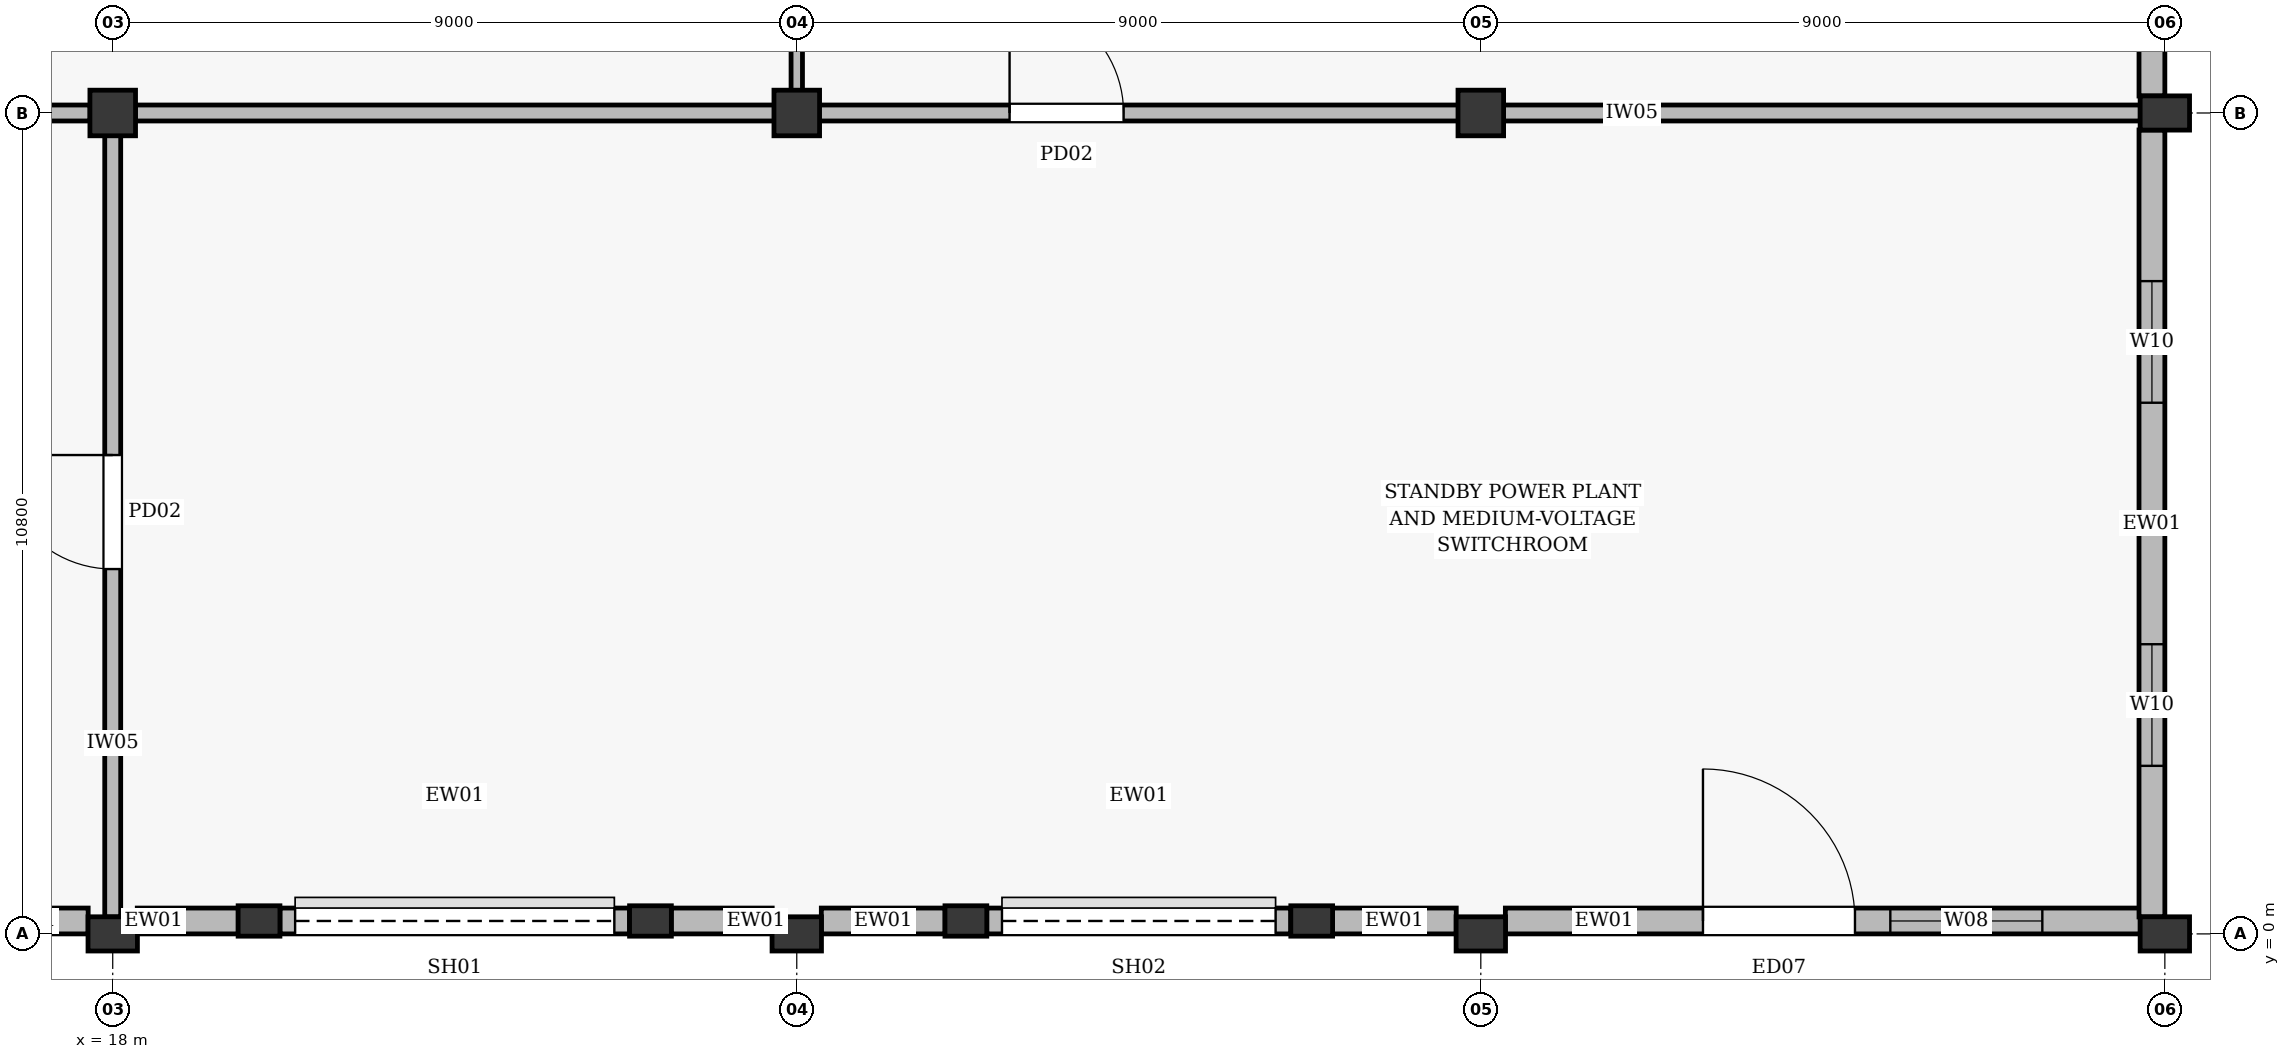
"""IFC4 building model, lengths in metres.
Left out: names, types, materials, properties, quantities, classifications, styles, units other than length and angle.
Written with IfcOpenShell. Run it as: python <this file> out.ifc"""

import sys

from ifc_helpers import new_model, si_unit, direction, frame, frame_2d, origin, origin_2d, place, context, subcontext, project, spatial, rectangle, extrude, element, fill, save


model = new_model("IFC4")
c1 = context("Model", 3, precision=1e-05, world=origin(), true_north=direction((0.0, 1.0)))
c2 = subcontext(c1, "Body", "Model", "MODEL_VIEW")
j1 = project(units=[si_unit("LENGTHUNIT", "METRE"), si_unit("PLANEANGLEUNIT", "RADIAN")], contexts=[c1])
p1 = place(None, origin())
s1 = spatial("IfcSite", under=j1, at=p1, CompositionType="ELEMENT")
p2 = place(p1, origin())
s2 = spatial("IfcBuilding", under=s1, at=p2, CompositionType="ELEMENT")
p3 = place(p2, origin())
s3 = spatial("IfcBuildingStorey", under=s2, at=p3, CompositionType="ELEMENT", Elevation=0.0)
p4 = place(p3, frame((18.0, 0.0, 0.0), z_axis=(0.0, 0.0, 1.0), x_axis=(1.0, 0.0, 0.0)))
e1 = element("IfcColumn", 1, at=p4, inside=s3, PredefinedType="PILASTER", context=c2, shape_type="SweptSolid", body=[
    extrude(rectangle(XDim=0.65, YDim=0.45, at=origin_2d()), origin(), (0.0, 0.0, 1.0), 6.6),
])
p5 = place(p3, frame((18.0, 10.8, 0.0), z_axis=(0.0, 0.0, 1.0), x_axis=(1.0, 0.0, 0.0)))
e2 = element("IfcColumn", 2, at=p5, inside=s3, PredefinedType="COLUMN", context=c2, shape_type="SweptSolid", body=[
    extrude(rectangle(XDim=0.6, YDim=0.6, at=origin_2d()), origin(), (0.0, 0.0, 1.0), 6.6),
])
p6 = place(p3, frame((27.0, 0.0, 0.0), z_axis=(0.0, 0.0, 1.0), x_axis=(1.0, 0.0, 0.0)))
e3 = element("IfcColumn", 3, at=p6, inside=s3, PredefinedType="PILASTER", context=c2, shape_type="SweptSolid", body=[
    extrude(rectangle(XDim=0.65, YDim=0.45, at=origin_2d()), origin(), (0.0, 0.0, 1.0), 6.6),
])
p7 = place(p3, frame((27.0, 10.8, 0.0), z_axis=(0.0, 0.0, 1.0), x_axis=(1.0, 0.0, 0.0)))
e4 = element("IfcColumn", 4, at=p7, inside=s3, PredefinedType="COLUMN", context=c2, shape_type="SweptSolid", body=[
    extrude(rectangle(XDim=0.6, YDim=0.6, at=origin_2d()), origin(), (0.0, 0.0, 1.0), 6.6),
])
p8 = place(p3, frame((36.0, 0.0, 0.0), z_axis=(0.0, 0.0, 1.0), x_axis=(1.0, 0.0, 0.0)))
e5 = element("IfcColumn", 5, at=p8, inside=s3, PredefinedType="PILASTER", context=c2, shape_type="SweptSolid", body=[
    extrude(rectangle(XDim=0.65, YDim=0.45, at=origin_2d()), origin(), (0.0, 0.0, 1.0), 6.6),
])
p9 = place(p3, frame((36.0, 10.8, 0.0), z_axis=(0.0, 0.0, 1.0), x_axis=(1.0, 0.0, 0.0)))
e6 = element("IfcColumn", 6, at=p9, inside=s3, PredefinedType="COLUMN", context=c2, shape_type="SweptSolid", body=[
    extrude(rectangle(XDim=0.6, YDim=0.6, at=origin_2d()), origin(), (0.0, 0.0, 1.0), 6.6),
])
for number, where, z_axis, x_axis in (
    (7, (45.0, 0.0, 0.0), (0.0, 0.0, 1.0), (1.0, 0.0, 0.0)),
    (8, (45.0, 10.8, 0.0), (0.0, 0.0, 1.0), (1.0, 0.0, 0.0)),
):
    element("IfcColumn", number, at=place(p3, frame(where, z_axis=z_axis, x_axis=x_axis)), inside=s3, PredefinedType="PILASTER", context=c2, shape_type="SweptSolid", body=[
        extrude(rectangle(XDim=0.65, YDim=0.45, at=origin_2d()), origin(), (0.0, 0.0, 1.0), 6.6),
    ])
p10 = place(p3, frame((16.048, 0.17, 0.0), z_axis=(0.0, 0.0, 1.0), x_axis=(1.0, 0.0, 0.0)))
e9 = element("IfcWall", 9, at=p10, inside=s3, PredefinedType="STANDARD", context=c2, shape_type="SweptSolid", body=[
    extrude(rectangle(XDim=1.629, YDim=0.34, at=frame_2d((0.814, 0.0))), origin(), (0.0, 0.0, 1.0), 4.28),
])
for number, where, z_axis, x_axis in (
    (10, (19.925, 0.17, 0.0), (0.0, 0.0, 1.0), (1.0, 0.0, 0.0)),
    (11, (25.075, 0.17, 0.0), (0.0, 0.0, 1.0), (1.0, 0.0, 0.0)),
):
    element("IfcColumn", number, at=place(p3, frame(where, z_axis=z_axis, x_axis=x_axis)), inside=s3, PredefinedType="PILASTER", context=c2, shape_type="SweptSolid", body=[
        extrude(rectangle(XDim=0.55, YDim=0.4, at=origin_2d()), origin(), (0.0, 0.0, 1.0), 4.3),
    ])
for number, where, z_axis, x_axis in (
    (12, (18.323, 0.17, 0.0), (0.0, 0.0, 1.0), (1.0, 0.0, 0.0)),
    (13, (25.348, 0.17, 0.0), (0.0, 0.0, 1.0), (1.0, 0.0, 0.0)),
):
    element("IfcWall", number, at=place(p3, frame(where, z_axis=z_axis, x_axis=x_axis)), inside=s3, PredefinedType="STANDARD", context=c2, shape_type="SweptSolid", body=[
        extrude(rectangle(XDim=1.329, YDim=0.34, at=frame_2d((0.665, 0.0))), origin(), (0.0, 0.0, 1.0), 4.28),
    ])
p11 = place(p3, frame((20.2, 0.17, 0.0), z_axis=(0.0, 0.0, 1.0), x_axis=(1.0, 0.0, 0.0)))
e14 = element("IfcWall", 14, at=p11, inside=s3, PredefinedType="STANDARD", context=c2, shape_type="SweptSolid", body=[
    extrude(rectangle(XDim=4.6, YDim=0.34, at=frame_2d((2.3, 0.0))), origin(), (0.0, 0.0, 1.0), 4.26),
])
p12 = place(p11, frame((0.2, 0.0, 0.005)))
e15 = element("IfcOpeningElement", 15, at=p12, cuts=e14, PredefinedType="OPENING", context=c2, shape_type="SweptSolid", body=[
    extrude(rectangle(XDim=4.2, YDim=3.6, at=frame_2d((2.1, 1.8))), frame((0.0, 0.182, 0.0), z_axis=(0.0, -1.0, 0.0), x_axis=(1.0, 0.0, 0.0)), (0.0, 0.0, 1.0), 0.364),
])
for number, where, z_axis, x_axis in (
    (16, (29.225, 0.17, 0.0), (0.0, 0.0, 1.0), (1.0, 0.0, 0.0)),
    (17, (33.775, 0.17, 0.0), (0.0, 0.0, 1.0), (1.0, 0.0, 0.0)),
):
    element("IfcColumn", number, at=place(p3, frame(where, z_axis=z_axis, x_axis=x_axis)), inside=s3, PredefinedType="PILASTER", context=c2, shape_type="SweptSolid", body=[
        extrude(rectangle(XDim=0.55, YDim=0.4, at=origin_2d()), origin(), (0.0, 0.0, 1.0), 4.3),
    ])
for number, where, z_axis, x_axis in (
    (18, (27.323, 0.17, 0.0), (0.0, 0.0, 1.0), (1.0, 0.0, 0.0)),
    (19, (34.048, 0.17, 0.0), (0.0, 0.0, 1.0), (1.0, 0.0, 0.0)),
):
    element("IfcWall", number, at=place(p3, frame(where, z_axis=z_axis, x_axis=x_axis)), inside=s3, PredefinedType="STANDARD", context=c2, shape_type="SweptSolid", body=[
        extrude(rectangle(XDim=1.629, YDim=0.34, at=frame_2d((0.814, 0.0))), origin(), (0.0, 0.0, 1.0), 4.28),
    ])
p13 = place(p3, frame((29.5, 0.17, 0.0), z_axis=(0.0, 0.0, 1.0), x_axis=(1.0, 0.0, 0.0)))
e20 = element("IfcWall", 20, at=p13, inside=s3, PredefinedType="STANDARD", context=c2, shape_type="SweptSolid", body=[
    extrude(rectangle(XDim=4.0, YDim=0.34, at=frame_2d((2.0, 0.0))), origin(), (0.0, 0.0, 1.0), 4.26),
])
p14 = place(p13, frame((0.2, 0.0, 0.005)))
e21 = element("IfcOpeningElement", 21, at=p14, cuts=e20, PredefinedType="OPENING", context=c2, shape_type="SweptSolid", body=[
    extrude(rectangle(XDim=3.6, YDim=3.2, at=frame_2d((1.8, 1.6))), frame((0.0, 0.182, 0.0), z_axis=(0.0, -1.0, 0.0), x_axis=(1.0, 0.0, 0.0)), (0.0, 0.0, 1.0), 0.364),
])
p15 = place(p3, frame((36.323, 0.17, 0.0), z_axis=(0.0, 0.0, 1.0), x_axis=(1.0, 0.0, 0.0)))
e22 = element("IfcWall", 22, at=p15, inside=s3, PredefinedType="STANDARD", context=c2, shape_type="SweptSolid", body=[
    extrude(rectangle(XDim=8.354, YDim=0.34, at=frame_2d((4.177, 0.0))), origin(), (0.0, 0.0, 1.0), 5.55),
])
p16 = place(p15, frame((2.6, 0.0, 0.005)))
e23 = element("IfcOpeningElement", 23, at=p16, cuts=e22, PredefinedType="OPENING", context=c2, shape_type="SweptSolid", body=[
    extrude(rectangle(XDim=2.0, YDim=2.4, at=frame_2d((1.0, 1.2))), frame((0.0, 0.182, 0.0), z_axis=(0.0, -1.0, 0.0), x_axis=(1.0, 0.0, 0.0)), (0.0, 0.0, 1.0), 0.364),
])
p17 = place(p15, frame((5.065, 0.0, 0.75)))
e24 = element("IfcOpeningElement", 24, at=p17, cuts=e22, PredefinedType="OPENING", context=c2, shape_type="SweptSolid", body=[
    extrude(rectangle(XDim=2.0, YDim=2.2, at=frame_2d((1.0, 1.1))), frame((0.0, 0.182, 0.0), z_axis=(0.0, -1.0, 0.0), x_axis=(1.0, 0.0, 0.0)), (0.0, 0.0, 1.0), 0.364),
])
p18 = place(p3, frame((44.83, 0.223, 0.0), z_axis=(0.0, 0.0, 1.0), x_axis=(0.0, 1.0, 0.0)))
e25 = element("IfcWall", 25, at=p18, inside=s3, PredefinedType="STANDARD", context=c2, shape_type="SweptSolid", body=[
    extrude(rectangle(XDim=10.354, YDim=0.34, at=frame_2d((5.177, 0.0))), origin(), (0.0, 0.0, 1.0), 5.55),
])
p19 = place(p18, frame((1.988, 0.0, 0.75)))
e26 = element("IfcOpeningElement", 26, at=p19, cuts=e25, PredefinedType="OPENING", context=c2, shape_type="SweptSolid", body=[
    extrude(rectangle(XDim=1.6, YDim=2.1, at=frame_2d((0.8, 1.05))), frame((0.0, 0.182, 0.0), z_axis=(0.0, -1.0, 0.0), x_axis=(1.0, 0.0, 0.0)), (0.0, 0.0, 1.0), 0.364),
])
p20 = place(p18, frame((6.765, 0.0, 0.75)))
e27 = element("IfcOpeningElement", 27, at=p20, cuts=e25, PredefinedType="OPENING", context=c2, shape_type="SweptSolid", body=[
    extrude(rectangle(XDim=1.6, YDim=2.1, at=frame_2d((0.8, 1.05))), frame((0.0, 0.182, 0.0), z_axis=(0.0, -1.0, 0.0), x_axis=(1.0, 0.0, 0.0)), (0.0, 0.0, 1.0), 0.364),
])
p21 = place(p3, frame((44.83, 11.023, 0.0), z_axis=(0.0, 0.0, 1.0), x_axis=(0.0, 1.0, 0.0)))
e28 = element("IfcWall", 28, at=p21, inside=s3, PredefinedType="STANDARD", context=c2, shape_type="SweptSolid", body=[
    extrude(rectangle(XDim=10.329, YDim=0.34, at=frame_2d((5.165, 0.0))), origin(), (0.0, 0.0, 1.0), 5.55),
])
p22 = place(p21, frame((4.0, 0.0, 0.005)))
e29 = element("IfcOpeningElement", 29, at=p22, cuts=e28, PredefinedType="OPENING", context=c2, shape_type="SweptSolid", body=[
    extrude(rectangle(XDim=1.8, YDim=2.35, at=frame_2d((0.9, 1.175))), frame((0.0, 0.182, 0.0), z_axis=(0.0, -1.0, 0.0), x_axis=(1.0, 0.0, 0.0)), (0.0, 0.0, 1.0), 0.364),
])
p23 = place(p21, frame((1.982, 0.0, 0.75)))
e30 = element("IfcOpeningElement", 30, at=p23, cuts=e28, PredefinedType="OPENING", context=c2, shape_type="SweptSolid", body=[
    extrude(rectangle(XDim=1.6, YDim=2.1, at=frame_2d((0.8, 1.05))), frame((0.0, 0.182, 0.0), z_axis=(0.0, -1.0, 0.0), x_axis=(1.0, 0.0, 0.0)), (0.0, 0.0, 1.0), 0.364),
])
p24 = place(p21, frame((6.747, 0.0, 0.75)))
e31 = element("IfcOpeningElement", 31, at=p24, cuts=e28, PredefinedType="OPENING", context=c2, shape_type="SweptSolid", body=[
    extrude(rectangle(XDim=1.6, YDim=2.1, at=frame_2d((0.8, 1.05))), frame((0.0, 0.182, 0.0), z_axis=(0.0, -1.0, 0.0), x_axis=(1.0, 0.0, 0.0)), (0.0, 0.0, 1.0), 0.364),
])
p25 = place(p3, frame((0.323, 10.8, 0.0), z_axis=(0.0, 0.0, 1.0), x_axis=(1.0, 0.0, 0.0)))
e32 = element("IfcWall", 32, at=p25, inside=s3, PredefinedType="PARTITIONING", context=c2, shape_type="SweptSolid", body=[
    extrude(rectangle(XDim=17.379, YDim=0.21, at=frame_2d((8.689, 0.0))), origin(), (0.0, 0.0, 1.0), 5.93),
])
p26 = place(p25, frame((4.277, 0.0, 0.005)))
e33 = element("IfcOpeningElement", 33, at=p26, cuts=e32, PredefinedType="OPENING", context=c2, shape_type="SweptSolid", body=[
    extrude(rectangle(XDim=1.85, YDim=2.35, at=frame_2d((0.925, 1.175))), frame((0.0, 0.117, 0.0), z_axis=(0.0, -1.0, 0.0), x_axis=(1.0, 0.0, 0.0)), (0.0, 0.0, 1.0), 0.234),
])
p27 = place(p3, frame((18.298, 10.8, 0.0), z_axis=(0.0, 0.0, 1.0), x_axis=(1.0, 0.0, 0.0)))
e34 = element("IfcWall", 34, at=p27, inside=s3, PredefinedType="PARTITIONING", context=c2, shape_type="SweptSolid", body=[
    extrude(rectangle(XDim=26.379, YDim=0.21, at=frame_2d((13.189, 0.0))), origin(), (0.0, 0.0, 1.0), 5.93),
])
p28 = place(p27, frame((11.502, 0.0, 0.005)))
e35 = element("IfcOpeningElement", 35, at=p28, cuts=e34, PredefinedType="OPENING", context=c2, shape_type="SweptSolid", body=[
    extrude(rectangle(XDim=1.5, YDim=2.25, at=frame_2d((0.75, 1.125))), frame((0.0, 0.117, 0.0), z_axis=(0.0, -1.0, 0.0), x_axis=(1.0, 0.0, 0.0)), (0.0, 0.0, 1.0), 0.234),
])
p29 = place(p3, frame((27.0, 10.903, 0.0), z_axis=(0.0, 0.0, 1.0), x_axis=(0.0, 1.0, 0.0)))
e36 = element("IfcWall", 36, at=p29, inside=s3, PredefinedType="PARTITIONING", context=c2, shape_type="SweptSolid", body=[
    extrude(rectangle(XDim=10.445, YDim=0.15, at=frame_2d((5.222, 0.0))), origin(), (0.0, 0.0, 1.0), 5.57),
])
p30 = place(p29, frame((4.003, 0.0, 0.005)))
e37 = element("IfcOpeningElement", 37, at=p30, cuts=e36, PredefinedType="OPENING", context=c2, shape_type="SweptSolid", body=[
    extrude(rectangle(XDim=1.1, YDim=2.1, at=frame_2d((0.55, 1.05))), frame((0.0, 0.087, 0.0), z_axis=(0.0, -1.0, 0.0), x_axis=(1.0, 0.0, 0.0)), (0.0, 0.0, 1.0), 0.174),
])
p31 = place(p3, frame((18.0, 0.223, 0.0), z_axis=(0.0, 0.0, 1.0), x_axis=(0.0, 1.0, 0.0)))
e38 = element("IfcWall", 38, at=p31, inside=s3, PredefinedType="PARTITIONING", context=c2, shape_type="SweptSolid", body=[
    extrude(rectangle(XDim=10.477, YDim=0.21, at=frame_2d((5.239, 0.0))), origin(), (0.0, 0.0, 1.0), 5.57),
])
p32 = place(p31, frame((4.577, 0.0, 0.005)))
e39 = element("IfcOpeningElement", 39, at=p32, cuts=e38, PredefinedType="OPENING", context=c2, shape_type="SweptSolid", body=[
    extrude(rectangle(XDim=1.5, YDim=2.25, at=frame_2d((0.75, 1.125))), frame((0.0, 0.117, 0.0), z_axis=(0.0, -1.0, 0.0), x_axis=(1.0, 0.0, 0.0)), (0.0, 0.0, 1.0), 0.234),
])
p33 = place(p12, origin())
e40 = element("IfcDoor", 40, at=p33, inside=s3, OperationType="ROLLINGUP", PredefinedType="GATE", context=c2, shape_type="SweptSolid", body=[
    extrude(rectangle(XDim=4.2, YDim=3.6, at=frame_2d((2.1, 1.8))), frame((0.0, 0.025, 0.0), z_axis=(0.0, -1.0, 0.0), x_axis=(1.0, 0.0, 0.0)), (0.0, 0.0, 1.0), 0.05),
])
fill(e15, e40)
p34 = place(p14, origin())
e41 = element("IfcDoor", 41, at=p34, inside=s3, OperationType="ROLLINGUP", PredefinedType="GATE", context=c2, shape_type="SweptSolid", body=[
    extrude(rectangle(XDim=3.6, YDim=3.2, at=frame_2d((1.8, 1.6))), frame((0.0, 0.025, 0.0), z_axis=(0.0, -1.0, 0.0), x_axis=(1.0, 0.0, 0.0)), (0.0, 0.0, 1.0), 0.05),
])
fill(e21, e41)
p35 = place(p16, origin())
e42 = element("IfcDoor", 42, at=p35, inside=s3, OperationType="DOUBLE_DOOR_SINGLE_SWING", PredefinedType="DOOR", context=c2, shape_type="SweptSolid", body=[
    extrude(rectangle(XDim=2.0, YDim=2.4, at=frame_2d((1.0, 1.2))), frame((0.0, 0.025, 0.0), z_axis=(0.0, -1.0, 0.0), x_axis=(1.0, 0.0, 0.0)), (0.0, 0.0, 1.0), 0.05),
])
fill(e23, e42)
p36 = place(p17, origin())
e43 = element("IfcWindow", 43, at=p36, inside=s3, PartitioningType="DOUBLE_PANEL_VERTICAL", PredefinedType="WINDOW", context=c2, shape_type="SweptSolid", body=[
    extrude(rectangle(XDim=2.0, YDim=2.2, at=frame_2d((1.0, 1.1))), frame((0.0, 0.03, 0.0), z_axis=(0.0, -1.0, 0.0), x_axis=(1.0, 0.0, 0.0)), (0.0, 0.0, 1.0), 0.06),
])
fill(e24, e43)
p37 = place(p19, origin())
e44 = element("IfcWindow", 44, at=p37, inside=s3, PartitioningType="DOUBLE_PANEL_VERTICAL", PredefinedType="WINDOW", context=c2, shape_type="SweptSolid", body=[
    extrude(rectangle(XDim=1.6, YDim=2.1, at=frame_2d((0.8, 1.05))), frame((0.0, 0.03, 0.0), z_axis=(0.0, -1.0, 0.0), x_axis=(1.0, 0.0, 0.0)), (0.0, 0.0, 1.0), 0.06),
])
fill(e26, e44)
p38 = place(p20, origin())
e45 = element("IfcWindow", 45, at=p38, inside=s3, PartitioningType="DOUBLE_PANEL_VERTICAL", PredefinedType="WINDOW", context=c2, shape_type="SweptSolid", body=[
    extrude(rectangle(XDim=1.6, YDim=2.1, at=frame_2d((0.8, 1.05))), frame((0.0, 0.03, 0.0), z_axis=(0.0, -1.0, 0.0), x_axis=(1.0, 0.0, 0.0)), (0.0, 0.0, 1.0), 0.06),
])
fill(e27, e45)
p39 = place(p28, origin())
e46 = element("IfcDoor", 46, at=p39, inside=s3, OperationType="SINGLE_SWING_LEFT", PredefinedType="DOOR", context=c2, shape_type="SweptSolid", body=[
    extrude(rectangle(XDim=1.5, YDim=2.25, at=frame_2d((0.75, 1.125))), frame((0.0, 0.025, 0.0), z_axis=(0.0, -1.0, 0.0), x_axis=(1.0, 0.0, 0.0)), (0.0, 0.0, 1.0), 0.05),
])
fill(e35, e46)
p40 = place(p32, origin())
e47 = element("IfcDoor", 47, at=p40, inside=s3, OperationType="SINGLE_SWING_RIGHT", PredefinedType="DOOR", context=c2, shape_type="SweptSolid", body=[
    extrude(rectangle(XDim=1.5, YDim=2.25, at=frame_2d((0.75, 1.125))), frame((0.0, 0.025, 0.0), z_axis=(0.0, -1.0, 0.0), x_axis=(1.0, 0.0, 0.0)), (0.0, 0.0, 1.0), 0.05),
])
fill(e39, e47)
save(model, sys.argv[1])
